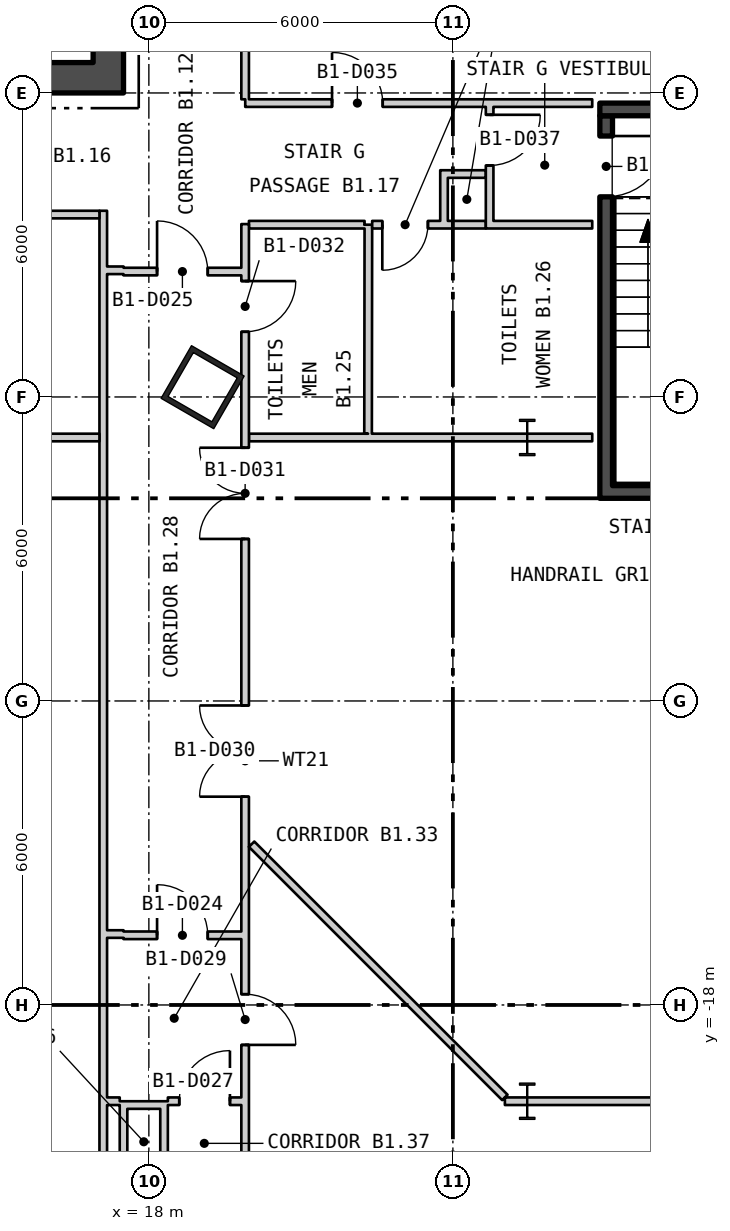
"""IFC4 building model, lengths in metres.
Left out: names, types, materials, properties, quantities, classifications, styles, units other than length and angle.
Written with IfcOpenShell. Run it as: python <this file> out.ifc"""

import sys

from ifc_helpers import new_model, si_unit, direction, frame, frame_2d, origin, origin_2d, place, context, subcontext, project, spatial, rectangle, hollow_rectangle, i_section, extrude, element, fill, save


model = new_model("IFC4")
c1 = context("Model", 3, precision=1e-05, world=origin(), true_north=direction((0.0, 1.0)))
c2 = subcontext(c1, "Body", "Model", "MODEL_VIEW")
j1 = project(units=[si_unit("LENGTHUNIT", "METRE"), si_unit("PLANEANGLEUNIT", "RADIAN")], contexts=[c1])
p1 = place(None, origin())
s1 = spatial("IfcSite", under=j1, at=p1, CompositionType="ELEMENT")
p2 = place(p1, origin())
s2 = spatial("IfcBuilding", under=s1, at=p2, CompositionType="ELEMENT")
p3 = place(p2, frame((0.0, 0.0, -5.7)))
s3 = spatial("IfcBuildingStorey", under=s2, at=p3, CompositionType="ELEMENT", Elevation=-5.7)
p4 = place(p3, frame((19.061, -5.807, 0.0), z_axis=(0.0, 0.0, 1.0), x_axis=(0.5, 0.866025403784, 0.0)))
e1 = element("IfcColumn", 1, at=p4, inside=s3, PredefinedType="COLUMN", context=c2, shape_type="SweptSolid", body=[
    extrude(hollow_rectangle(XDim=1.2, YDim=1.2, WallThickness=0.1, at=origin_2d()), origin(), (0.0, 0.0, 1.0), 5.7),
])
for number, where, z_axis, x_axis in (
    (2, (25.467, -6.8, 0.0), (0.0, 0.0, 1.0), (1.0, 0.0, 0.0)),
    (3, (25.467, -19.9, 0.0), (0.0, 0.0, 1.0), (1.0, 0.0, 0.0)),
):
    element("IfcColumn", number, at=place(p3, frame(where, z_axis=z_axis, x_axis=x_axis)), inside=s3, PredefinedType="COLUMN", context=c2, shape_type="SweptSolid", body=[
        extrude(i_section(OverallWidth=0.304, OverallDepth=0.716, WebThickness=0.021, FlangeThickness=0.04, at=origin_2d()), origin(), (0.0, 0.0, 1.0), 5.7),
    ])
p5 = place(p3, frame((-17.5, 0.3, 0.0), z_axis=(0.0, 0.0, 1.0), x_axis=(1.0, 0.0, 0.0)))
e4 = element("IfcWall", 4, at=p5, inside=s3, PredefinedType="SHEAR", context=c2, shape_type="SweptSolid", body=[
    extrude(rectangle(XDim=35.0, YDim=0.6, at=frame_2d((17.5, 0.0))), origin(), (0.0, 0.0, 1.0), 5.25),
])
p6 = place(p5, frame((12.0, 0.0, 0.0)))
e5 = element("IfcOpeningElement", 5, at=p6, cuts=e4, PredefinedType="OPENING", context=c2, shape_type="SweptSolid", body=[
    extrude(rectangle(XDim=1.8, YDim=2.4, at=frame_2d((0.9, 1.2))), frame((0.0, 0.31, 0.0), z_axis=(0.0, -1.0, 0.0), x_axis=(1.0, 0.0, 0.0)), (0.0, 0.0, 1.0), 0.62),
])
p7 = place(p5, frame((22.0, 0.0, 0.0)))
e6 = element("IfcOpeningElement", 6, at=p7, cuts=e4, PredefinedType="OPENING", context=c2, shape_type="SweptSolid", body=[
    extrude(rectangle(XDim=1.8, YDim=2.4, at=frame_2d((0.9, 1.2))), frame((0.0, 0.31, 0.0), z_axis=(0.0, -1.0, 0.0), x_axis=(1.0, 0.0, 0.0)), (0.0, 0.0, 1.0), 0.62),
])
p8 = place(p3, frame((17.2, 0.6, 0.0), z_axis=(0.0, 0.0, 1.0), x_axis=(0.0, 1.0, 0.0)))
e7 = element("IfcWall", 7, at=p8, inside=s3, PredefinedType="SHEAR", context=c2, shape_type="SweptSolid", body=[
    extrude(rectangle(XDim=16.8, YDim=0.6, at=frame_2d((8.4, 0.0))), origin(), (0.0, 0.0, 1.0), 5.25),
])
p9 = place(p8, frame((5.7, 0.0, 0.0)))
e8 = element("IfcOpeningElement", 8, at=p9, cuts=e7, PredefinedType="OPENING", context=c2, shape_type="SweptSolid", body=[
    extrude(rectangle(XDim=1.5, YDim=2.1, at=frame_2d((0.75, 1.05))), frame((0.0, 0.31, 0.0), z_axis=(0.0, -1.0, 0.0), x_axis=(1.0, 0.0, 0.0)), (0.0, 0.0, 1.0), 0.62),
])
p10 = place(p8, frame((0.452, 0.0, 0.0)))
e9 = element("IfcOpeningElement", 9, at=p10, cuts=e7, PredefinedType="OPENING", context=c2, shape_type="SweptSolid", body=[
    extrude(rectangle(XDim=0.9, YDim=2.1, at=frame_2d((0.45, 1.05))), frame((0.0, 0.31, 0.0), z_axis=(0.0, -1.0, 0.0), x_axis=(1.0, 0.0, 0.0)), (0.0, 0.0, 1.0), 0.62),
])
p11 = place(p8, frame((3.302, 0.0, 0.0)))
e10 = element("IfcOpeningElement", 10, at=p11, cuts=e7, PredefinedType="OPENING", context=c2, shape_type="SweptSolid", body=[
    extrude(rectangle(XDim=0.9, YDim=2.1, at=frame_2d((0.45, 1.05))), frame((0.0, 0.31, 0.0), z_axis=(0.0, -1.0, 0.0), x_axis=(1.0, 0.0, 0.0)), (0.0, 0.0, 1.0), 0.62),
])
p12 = place(p8, frame((10.697, 0.0, 0.0)))
e11 = element("IfcOpeningElement", 11, at=p12, cuts=e7, PredefinedType="OPENING", context=c2, shape_type="SweptSolid", body=[
    extrude(rectangle(XDim=0.9, YDim=2.1, at=frame_2d((0.45, 1.05))), frame((0.0, 0.31, 0.0), z_axis=(0.0, -1.0, 0.0), x_axis=(1.0, 0.0, 0.0)), (0.0, 0.0, 1.0), 0.62),
])
p13 = place(p8, frame((15.4, 0.0, 0.0)))
e12 = element("IfcOpeningElement", 12, at=p13, cuts=e7, PredefinedType="OPENING", context=c2, shape_type="SweptSolid", body=[
    extrude(rectangle(XDim=1.0, YDim=2.1, at=frame_2d((0.5, 1.05))), frame((0.0, 0.31, 0.0), z_axis=(0.0, -1.0, 0.0), x_axis=(1.0, 0.0, 0.0)), (0.0, 0.0, 1.0), 0.62),
])
p14 = place(p3, frame((27.025, -7.75, 0.0), z_axis=(0.0, 0.0, 1.0), x_axis=(0.0, 1.0, 0.0)))
e13 = element("IfcWall", 13, at=p14, inside=s3, PredefinedType="SHEAR", context=c2, shape_type="SweptSolid", body=[
    extrude(rectangle(XDim=7.3, YDim=0.25, at=frame_2d((3.65, 0.0))), origin(), (0.0, 0.0, 1.0), 5.25),
])
p15 = place(p14, frame((5.7, 0.0, 0.0)))
e14 = element("IfcOpeningElement", 14, at=p15, cuts=e13, PredefinedType="OPENING", context=c2, shape_type="SweptSolid", body=[
    extrude(rectangle(XDim=1.2, YDim=2.1, at=frame_2d((0.6, 1.05))), frame((0.0, 0.135, 0.0), z_axis=(0.0, -1.0, 0.0), x_axis=(1.0, 0.0, 0.0)), (0.0, 0.0, 1.0), 0.27),
])
for number, where, z_axis, x_axis in (
    (15, (26.9, -7.875, 0.0), (0.0, 0.0, 1.0), (1.0, 0.0, 0.0)),
    (16, (26.9, -0.325, 0.0), (0.0, 0.0, 1.0), (1.0, 0.0, 0.0)),
):
    element("IfcWall", number, at=place(p3, frame(where, z_axis=z_axis, x_axis=x_axis)), inside=s3, PredefinedType="SHEAR", context=c2, shape_type="SweptSolid", body=[
        extrude(rectangle(XDim=3.5, YDim=0.25, at=frame_2d((1.75, 0.0))), origin(), (0.0, 0.0, 1.0), 5.25),
    ])
p16 = place(p3, frame((11.575, -2.4, 0.0), z_axis=(0.0, 0.0, 1.0), x_axis=(1.0, 0.0, 0.0)))
e17 = element("IfcWall", 17, at=p16, inside=s3, PredefinedType="PARTITIONING", context=c2, shape_type="SweptSolid", body=[
    extrude(rectangle(XDim=5.45, YDim=0.15, at=frame_2d((2.725, 0.0))), origin(), (0.0, 0.0, 1.0), 5.25),
])
p17 = place(p16, frame((2.804, 0.0, 0.0)))
e18 = element("IfcOpeningElement", 18, at=p17, cuts=e17, PredefinedType="OPENING", context=c2, shape_type="SweptSolid", body=[
    extrude(rectangle(XDim=1.0, YDim=2.1, at=frame_2d((0.5, 1.05))), frame((0.0, 0.085, 0.0), z_axis=(0.0, -1.0, 0.0), x_axis=(1.0, 0.0, 0.0)), (0.0, 0.0, 1.0), 0.17),
])
p18 = place(p3, frame((11.926, -6.8, 0.0), z_axis=(0.0, 0.0, 1.0), x_axis=(1.0, 0.0, 0.0)))
e19 = element("IfcWall", 19, at=p18, inside=s3, PredefinedType="PARTITIONING", context=c2, shape_type="SweptSolid", body=[
    extrude(rectangle(XDim=5.099, YDim=0.15, at=frame_2d((2.55, 0.0))), origin(), (0.0, 0.0, 1.0), 5.25),
])
p19 = place(p3, frame((17.1, -21.375, 0.0), z_axis=(0.0, 0.0, 1.0), x_axis=(0.0, 1.0, 0.0)))
e20 = element("IfcWall", 20, at=p19, inside=s3, PredefinedType="PARTITIONING", context=c2, shape_type="SweptSolid", body=[
    extrude(rectangle(XDim=19.05, YDim=0.15, at=frame_2d((9.525, 0.0))), origin(), (0.0, 0.0, 1.0), 5.25),
])
p20 = place(p3, frame((17.175, -19.9, 0.0), z_axis=(0.0, 0.0, 1.0), x_axis=(1.0, 0.0, 0.0)))
e21 = element("IfcWall", 21, at=p20, inside=s3, PredefinedType="PARTITIONING", context=c2, shape_type="SweptSolid", body=[
    extrude(rectangle(XDim=0.25, YDim=0.15, at=frame_2d((0.125, 0.0))), origin(), (0.0, 0.0, 1.0), 5.25),
])
for number, where, z_axis, x_axis in (
    (22, (17.175, -16.6, 0.0), (0.0, 0.0, 1.0), (1.0, 0.0, 0.0)),
    (23, (17.175, -3.5, 0.0), (0.0, 0.0, 1.0), (1.0, 0.0, 0.0)),
):
    element("IfcWall", number, at=place(p3, frame(where, z_axis=z_axis, x_axis=x_axis)), inside=s3, PredefinedType="PARTITIONING", context=c2, shape_type="SweptSolid", body=[
        extrude(rectangle(XDim=0.325, YDim=0.15, at=frame_2d((0.163, 0.0))), origin(), (0.0, 0.0, 1.0), 5.25),
    ])
p21 = place(p3, frame((17.5, -21.5, 0.0), z_axis=(0.0, 0.0, 1.0), x_axis=(0.0, 1.0, 0.0)))
e24 = element("IfcWall", 24, at=p21, inside=s3, PredefinedType="PARTITIONING", context=c2, shape_type="SweptSolid", body=[
    extrude(rectangle(XDim=1.6, YDim=0.15, at=frame_2d((0.8, 0.0))), origin(), (0.0, 0.0, 1.0), 5.25),
])
p22 = place(p3, frame((17.5, -16.625, 0.0), z_axis=(0.0, 0.0, 1.0), x_axis=(1.0, 0.0, 0.0)))
e25 = element("IfcWall", 25, at=p22, inside=s3, PredefinedType="PARTITIONING", context=c2, shape_type="SweptSolid", body=[
    extrude(rectangle(XDim=2.325, YDim=0.15, at=frame_2d((1.163, 0.0))), origin(), (0.0, 0.0, 1.0), 5.25),
])
p23 = place(p22, frame((0.662, 0.0, 0.0)))
e26 = element("IfcOpeningElement", 26, at=p23, cuts=e25, PredefinedType="OPENING", context=c2, shape_type="SweptSolid", body=[
    extrude(rectangle(XDim=1.0, YDim=2.1, at=frame_2d((0.5, 1.05))), frame((0.0, 0.085, 0.0), z_axis=(0.0, -1.0, 0.0), x_axis=(1.0, 0.0, 0.0)), (0.0, 0.0, 1.0), 0.17),
])
p24 = place(p3, frame((17.5, -3.525, 0.0), z_axis=(0.0, 0.0, 1.0), x_axis=(1.0, 0.0, 0.0)))
e27 = element("IfcWall", 27, at=p24, inside=s3, PredefinedType="PARTITIONING", context=c2, shape_type="SweptSolid", body=[
    extrude(rectangle(XDim=2.325, YDim=0.15, at=frame_2d((1.163, 0.0))), origin(), (0.0, 0.0, 1.0), 5.25),
])
p25 = place(p24, frame((0.662, 0.0, 0.0)))
e28 = element("IfcOpeningElement", 28, at=p25, cuts=e27, PredefinedType="OPENING", context=c2, shape_type="SweptSolid", body=[
    extrude(rectangle(XDim=1.0, YDim=2.1, at=frame_2d((0.5, 1.05))), frame((0.0, 0.085, 0.0), z_axis=(0.0, -1.0, 0.0), x_axis=(1.0, 0.0, 0.0)), (0.0, 0.0, 1.0), 0.17),
])
p26 = place(p3, frame((17.575, -19.975, 0.0), z_axis=(0.0, 0.0, 1.0), x_axis=(1.0, 0.0, 0.0)))
e29 = element("IfcWall", 29, at=p26, inside=s3, PredefinedType="PARTITIONING", context=c2, shape_type="SweptSolid", body=[
    extrude(rectangle(XDim=0.65, YDim=0.15, at=frame_2d((0.325, 0.0))), origin(), (0.0, 0.0, 1.0), 5.25),
])
p27 = place(p3, frame((18.3, -21.5, 0.0), z_axis=(0.0, 0.0, 1.0), x_axis=(0.0, 1.0, 0.0)))
e30 = element("IfcWall", 30, at=p27, inside=s3, PredefinedType="PARTITIONING", context=c2, shape_type="SweptSolid", body=[
    extrude(rectangle(XDim=1.6, YDim=0.15, at=frame_2d((0.8, 0.0))), origin(), (0.0, 0.0, 1.0), 5.25),
])
p28 = place(p3, frame((18.375, -19.9, 0.0), z_axis=(0.0, 0.0, 1.0), x_axis=(1.0, 0.0, 0.0)))
e31 = element("IfcWall", 31, at=p28, inside=s3, PredefinedType="PARTITIONING", context=c2, shape_type="SweptSolid", body=[
    extrude(rectangle(XDim=1.45, YDim=0.15, at=frame_2d((0.725, 0.0))), origin(), (0.0, 0.0, 1.0), 5.25),
])
p29 = place(p28, frame((0.225, 0.0, 0.0)))
e32 = element("IfcOpeningElement", 32, at=p29, cuts=e31, PredefinedType="OPENING", context=c2, shape_type="SweptSolid", body=[
    extrude(rectangle(XDim=1.0, YDim=2.1, at=frame_2d((0.5, 1.05))), frame((0.0, 0.085, 0.0), z_axis=(0.0, -1.0, 0.0), x_axis=(1.0, 0.0, 0.0)), (0.0, 0.0, 1.0), 0.17),
])
p30 = place(p3, frame((19.9, -23.775, 0.0), z_axis=(0.0, 0.0, 1.0), x_axis=(0.0, 1.0, 0.0)))
e33 = element("IfcWall", 33, at=p30, inside=s3, PredefinedType="PARTITIONING", context=c2, shape_type="SweptSolid", body=[
    extrude(rectangle(XDim=21.187, YDim=0.15, at=frame_2d((10.594, 0.0))), origin(), (0.0, 0.0, 1.0), 5.25),
])
p31 = place(p30, frame((4.987, 0.0, 0.0)))
e34 = element("IfcOpeningElement", 34, at=p31, cuts=e33, PredefinedType="OPENING", context=c2, shape_type="SweptSolid", body=[
    extrude(rectangle(XDim=1.0, YDim=2.1, at=frame_2d((0.5, 1.05))), frame((0.0, 0.085, 0.0), z_axis=(0.0, -1.0, 0.0), x_axis=(1.0, 0.0, 0.0)), (0.0, 0.0, 1.0), 0.17),
])
p32 = place(p30, frame((9.886, 0.0, 0.0)))
e35 = element("IfcOpeningElement", 35, at=p32, cuts=e33, PredefinedType="OPENING", context=c2, shape_type="SweptSolid", body=[
    extrude(rectangle(XDim=1.8, YDim=2.1, at=frame_2d((0.9, 1.05))), frame((0.0, 0.085, 0.0), z_axis=(0.0, -1.0, 0.0), x_axis=(1.0, 0.0, 0.0)), (0.0, 0.0, 1.0), 0.17),
])
p33 = place(p30, frame((14.973, 0.0, 0.0)))
e36 = element("IfcOpeningElement", 36, at=p33, cuts=e33, PredefinedType="OPENING", context=c2, shape_type="SweptSolid", body=[
    extrude(rectangle(XDim=1.8, YDim=2.1, at=frame_2d((0.9, 1.05))), frame((0.0, 0.085, 0.0), z_axis=(0.0, -1.0, 0.0), x_axis=(1.0, 0.0, 0.0)), (0.0, 0.0, 1.0), 0.17),
])
p34 = place(p30, frame((19.062, 0.0, 0.0)))
e37 = element("IfcOpeningElement", 37, at=p34, cuts=e33, PredefinedType="OPENING", context=c2, shape_type="SweptSolid", body=[
    extrude(rectangle(XDim=1.0, YDim=2.1, at=frame_2d((0.5, 1.05))), frame((0.0, 0.085, 0.0), z_axis=(0.0, -1.0, 0.0), x_axis=(1.0, 0.0, 0.0)), (0.0, 0.0, 1.0), 0.17),
])
p35 = place(p3, frame((19.9, -0.125, 0.0), z_axis=(0.0, 0.0, 1.0), x_axis=(0.0, 1.0, 0.0)))
e38 = element("IfcWall", 38, at=p35, inside=s3, PredefinedType="PARTITIONING", context=c2, shape_type="SweptSolid", body=[
    extrude(rectangle(XDim=1.15, YDim=0.15, at=frame_2d((0.575, 0.0))), origin(), (0.0, 0.0, 1.0), 5.25),
])
p36 = place(p3, frame((19.902, -0.2, 0.0), z_axis=(0.0, 0.0, 1.0), x_axis=(1.0, 0.0, 0.0)))
e39 = element("IfcWall", 39, at=p36, inside=s3, PredefinedType="PARTITIONING", context=c2, shape_type="SweptSolid", body=[
    extrude(rectangle(XDim=6.848, YDim=0.15, at=frame_2d((3.424, 0.0))), origin(), (0.0, 0.0, 1.0), 5.25),
])
p37 = place(p36, frame((1.713, 0.0, 0.0)))
e40 = element("IfcOpeningElement", 40, at=p37, cuts=e39, PredefinedType="OPENING", context=c2, shape_type="SweptSolid", body=[
    extrude(rectangle(XDim=1.0, YDim=2.1, at=frame_2d((0.5, 1.05))), frame((0.0, 0.085, 0.0), z_axis=(0.0, -1.0, 0.0), x_axis=(1.0, 0.0, 0.0)), (0.0, 0.0, 1.0), 0.17),
])
p38 = place(p3, frame((19.975, -6.8, 0.0), z_axis=(0.0, 0.0, 1.0), x_axis=(1.0, 0.0, 0.0)))
e41 = element("IfcWall", 41, at=p38, inside=s3, PredefinedType="PARTITIONING", context=c2, shape_type="SweptSolid", body=[
    extrude(rectangle(XDim=6.775, YDim=0.15, at=frame_2d((3.388, 0.0))), origin(), (0.0, 0.0, 1.0), 5.25),
])
p39 = place(p3, frame((19.975, -2.6, 0.0), z_axis=(0.0, 0.0, 1.0), x_axis=(1.0, 0.0, 0.0)))
e42 = element("IfcWall", 42, at=p39, inside=s3, PredefinedType="PARTITIONING", context=c2, shape_type="SweptSolid", body=[
    extrude(rectangle(XDim=2.282, YDim=0.15, at=frame_2d((1.141, 0.0))), origin(), (0.0, 0.0, 1.0), 5.25),
])
p40 = place(p3, frame((20.028, -14.827, 0.0), z_axis=(0.0, 0.0, 1.0), x_axis=(0.707106781187, -0.707106781187, 0.0)))
e43 = element("IfcWall", 43, at=p40, inside=s3, PredefinedType="PARTITIONING", context=c2, shape_type="SweptSolid", body=[
    extrude(rectangle(XDim=7.068, YDim=0.15, at=frame_2d((3.534, 0.0))), origin(), (0.0, 0.0, 1.0), 5.25),
])
p41 = place(p3, frame((22.326, -6.725, 0.0), z_axis=(0.0, 0.0, 1.0), x_axis=(0.001454543916, 0.99999894215, 0.0)))
e44 = element("IfcWall", 44, at=p41, inside=s3, PredefinedType="PARTITIONING", context=c2, shape_type="SweptSolid", body=[
    extrude(rectangle(XDim=4.125, YDim=0.15, at=frame_2d((2.062, 0.0))), origin(), (0.0, 0.0, 1.0), 5.25),
])
p42 = place(p3, frame((22.407, -2.6, 0.0), z_axis=(0.0, 0.0, 1.0), x_axis=(1.0, 0.0, 0.0)))
e45 = element("IfcWall", 45, at=p42, inside=s3, PredefinedType="PARTITIONING", context=c2, shape_type="SweptSolid", body=[
    extrude(rectangle(XDim=1.343, YDim=0.15, at=frame_2d((0.671, 0.0))), origin(), (0.0, 0.0, 1.0), 5.25),
])
p43 = place(p42, frame((0.2, 0.0, 0.0)))
e46 = element("IfcOpeningElement", 46, at=p43, cuts=e45, PredefinedType="OPENING", context=c2, shape_type="SweptSolid", body=[
    extrude(rectangle(XDim=0.9, YDim=2.1, at=frame_2d((0.45, 1.05))), frame((0.0, 0.085, 0.0), z_axis=(0.0, -1.0, 0.0), x_axis=(1.0, 0.0, 0.0)), (0.0, 0.0, 1.0), 0.17),
])
p44 = place(p3, frame((23.825, -2.675, 0.0), z_axis=(0.0, 0.0, 1.0), x_axis=(0.0, 1.0, 0.0)))
e47 = element("IfcWall", 47, at=p44, inside=s3, PredefinedType="PARTITIONING", context=c2, shape_type="SweptSolid", body=[
    extrude(rectangle(XDim=1.15, YDim=0.15, at=frame_2d((0.575, 0.0))), origin(), (0.0, 0.0, 1.0), 5.25),
])
for number, where, z_axis, x_axis in (
    (48, (23.9, -2.6, 0.0), (0.0, 0.0, 1.0), (1.0, 0.0, 0.0)),
    (49, (23.9, -1.6, 0.0), (0.0, 0.0, 1.0), (1.0, 0.0, 0.0)),
):
    element("IfcWall", number, at=place(p3, frame(where, z_axis=z_axis, x_axis=x_axis)), inside=s3, PredefinedType="PARTITIONING", context=c2, shape_type="SweptSolid", body=[
        extrude(rectangle(XDim=0.75, YDim=0.15, at=frame_2d((0.375, 0.0))), origin(), (0.0, 0.0, 1.0), 5.25),
    ])
p45 = place(p3, frame((24.725, -2.675, 0.0), z_axis=(0.0, 0.0, 1.0), x_axis=(0.0, 1.0, 0.0)))
e50 = element("IfcWall", 50, at=p45, inside=s3, PredefinedType="PARTITIONING", context=c2, shape_type="SweptSolid", body=[
    extrude(rectangle(XDim=1.087, YDim=0.15, at=frame_2d((0.543, 0.0))), origin(), (0.0, 0.0, 1.0), 5.25),
])
p46 = place(p3, frame((24.725, -1.588, 0.0), z_axis=(0.0, 0.0, 1.0), x_axis=(0.0, 1.0, 0.0)))
e51 = element("IfcWall", 51, at=p46, inside=s3, PredefinedType="PARTITIONING", context=c2, shape_type="SweptSolid", body=[
    extrude(rectangle(XDim=1.313, YDim=0.15, at=frame_2d((0.656, 0.0))), origin(), (0.0, 0.0, 1.0), 5.25),
])
p47 = place(p46, frame((0.157, 0.0, 0.0)))
e52 = element("IfcOpeningElement", 52, at=p47, cuts=e51, PredefinedType="OPENING", context=c2, shape_type="SweptSolid", body=[
    extrude(rectangle(XDim=1.0, YDim=2.1, at=frame_2d((0.5, 1.05))), frame((0.0, 0.085, 0.0), z_axis=(0.0, -1.0, 0.0), x_axis=(1.0, 0.0, 0.0)), (0.0, 0.0, 1.0), 0.17),
])
p48 = place(p3, frame((24.8, -2.6, 0.0), z_axis=(0.0, 0.0, 1.0), x_axis=(1.0, 0.0, 0.0)))
e53 = element("IfcWall", 53, at=p48, inside=s3, PredefinedType="PARTITIONING", context=c2, shape_type="SweptSolid", body=[
    extrude(rectangle(XDim=1.95, YDim=0.15, at=frame_2d((0.975, 0.0))), origin(), (0.0, 0.0, 1.0), 5.25),
])
p49 = place(p3, frame((25.026, -19.9, 0.0), z_axis=(0.0, 0.0, 1.0), x_axis=(0.999999997075, 7.6487685e-05, 0.0)))
e54 = element("IfcWall", 54, at=p49, inside=s3, PredefinedType="PARTITIONING", context=c2, shape_type="SweptSolid", body=[
    extrude(rectangle(XDim=13.074, YDim=0.15, at=frame_2d((6.537, 0.0))), origin(), (0.0, 0.0, 1.0), 5.25),
])
p50 = place(p15, origin())
e55 = element("IfcDoor", 55, at=p50, inside=s3, OperationType="SINGLE_SWING_RIGHT", PredefinedType="DOOR", context=c2, shape_type="SweptSolid", body=[
    extrude(rectangle(XDim=1.2, YDim=2.1, at=frame_2d((0.6, 1.05))), frame((0.0, 0.025, 0.0), z_axis=(0.0, -1.0, 0.0), x_axis=(1.0, 0.0, 0.0)), (0.0, 0.0, 1.0), 0.05),
])
fill(e14, e55)
p51 = place(p23, origin())
e56 = element("IfcDoor", 56, at=p51, inside=s3, OperationType="SINGLE_SWING_RIGHT", PredefinedType="DOOR", context=c2, shape_type="SweptSolid", body=[
    extrude(rectangle(XDim=1.0, YDim=2.1, at=frame_2d((0.5, 1.05))), frame((0.0, 0.025, 0.0), z_axis=(0.0, -1.0, 0.0), x_axis=(1.0, 0.0, 0.0)), (0.0, 0.0, 1.0), 0.05),
])
fill(e26, e56)
p52 = place(p25, origin())
e57 = element("IfcDoor", 57, at=p52, inside=s3, OperationType="SINGLE_SWING_RIGHT", PredefinedType="DOOR", context=c2, shape_type="SweptSolid", body=[
    extrude(rectangle(XDim=1.0, YDim=2.1, at=frame_2d((0.5, 1.05))), frame((0.0, 0.025, 0.0), z_axis=(0.0, -1.0, 0.0), x_axis=(1.0, 0.0, 0.0)), (0.0, 0.0, 1.0), 0.05),
])
fill(e28, e57)
p53 = place(p29, origin())
e58 = element("IfcDoor", 58, at=p53, inside=s3, OperationType="SINGLE_SWING_LEFT", PredefinedType="DOOR", context=c2, shape_type="SweptSolid", body=[
    extrude(rectangle(XDim=1.0, YDim=2.1, at=frame_2d((0.5, 1.05))), frame((0.0, 0.025, 0.0), z_axis=(0.0, -1.0, 0.0), x_axis=(1.0, 0.0, 0.0)), (0.0, 0.0, 1.0), 0.05),
])
fill(e32, e58)
p54 = place(p31, origin())
e59 = element("IfcDoor", 59, at=p54, inside=s3, OperationType="SINGLE_SWING_LEFT", PredefinedType="DOOR", context=c2, shape_type="SweptSolid", body=[
    extrude(rectangle(XDim=1.0, YDim=2.1, at=frame_2d((0.5, 1.05))), frame((0.0, 0.025, 0.0), z_axis=(0.0, -1.0, 0.0), x_axis=(1.0, 0.0, 0.0)), (0.0, 0.0, 1.0), 0.05),
])
fill(e34, e59)
p55 = place(p32, origin())
e60 = element("IfcDoor", 60, at=p55, inside=s3, OperationType="DOUBLE_DOOR_SINGLE_SWING", PredefinedType="DOOR", context=c2, shape_type="SweptSolid", body=[
    extrude(rectangle(XDim=1.8, YDim=2.1, at=frame_2d((0.9, 1.05))), frame((0.0, 0.025, 0.0), z_axis=(0.0, -1.0, 0.0), x_axis=(1.0, 0.0, 0.0)), (0.0, 0.0, 1.0), 0.05),
])
fill(e35, e60)
p56 = place(p33, origin())
e61 = element("IfcDoor", 61, at=p56, inside=s3, OperationType="DOUBLE_DOOR_SINGLE_SWING", PredefinedType="DOOR", context=c2, shape_type="SweptSolid", body=[
    extrude(rectangle(XDim=1.8, YDim=2.1, at=frame_2d((0.9, 1.05))), frame((0.0, 0.025, 0.0), z_axis=(0.0, -1.0, 0.0), x_axis=(1.0, 0.0, 0.0)), (0.0, 0.0, 1.0), 0.05),
])
fill(e36, e61)
p57 = place(p34, origin())
e62 = element("IfcDoor", 62, at=p57, inside=s3, OperationType="SINGLE_SWING_RIGHT", PredefinedType="DOOR", context=c2, shape_type="SweptSolid", body=[
    extrude(rectangle(XDim=1.0, YDim=2.1, at=frame_2d((0.5, 1.05))), frame((0.0, 0.025, 0.0), z_axis=(0.0, -1.0, 0.0), x_axis=(1.0, 0.0, 0.0)), (0.0, 0.0, 1.0), 0.05),
])
fill(e37, e62)
p58 = place(p37, origin())
e63 = element("IfcDoor", 63, at=p58, inside=s3, OperationType="SINGLE_SWING_RIGHT", PredefinedType="DOOR", context=c2, shape_type="SweptSolid", body=[
    extrude(rectangle(XDim=1.0, YDim=2.1, at=frame_2d((0.5, 1.05))), frame((0.0, 0.025, 0.0), z_axis=(0.0, -1.0, 0.0), x_axis=(1.0, 0.0, 0.0)), (0.0, 0.0, 1.0), 0.05),
])
fill(e40, e63)
p59 = place(p43, origin())
e64 = element("IfcDoor", 64, at=p59, inside=s3, OperationType="SINGLE_SWING_LEFT", PredefinedType="DOOR", context=c2, shape_type="SweptSolid", body=[
    extrude(rectangle(XDim=0.9, YDim=2.1, at=frame_2d((0.45, 1.05))), frame((0.0, 0.025, 0.0), z_axis=(0.0, -1.0, 0.0), x_axis=(1.0, 0.0, 0.0)), (0.0, 0.0, 1.0), 0.05),
])
fill(e46, e64)
p60 = place(p47, origin())
e65 = element("IfcDoor", 65, at=p60, inside=s3, OperationType="SINGLE_SWING_RIGHT", PredefinedType="DOOR", context=c2, shape_type="SweptSolid", body=[
    extrude(rectangle(XDim=1.0, YDim=2.1, at=frame_2d((0.5, 1.05))), frame((0.0, 0.025, 0.0), z_axis=(0.0, -1.0, 0.0), x_axis=(1.0, 0.0, 0.0)), (0.0, 0.0, 1.0), 0.05),
])
fill(e52, e65)
save(model, sys.argv[1])
